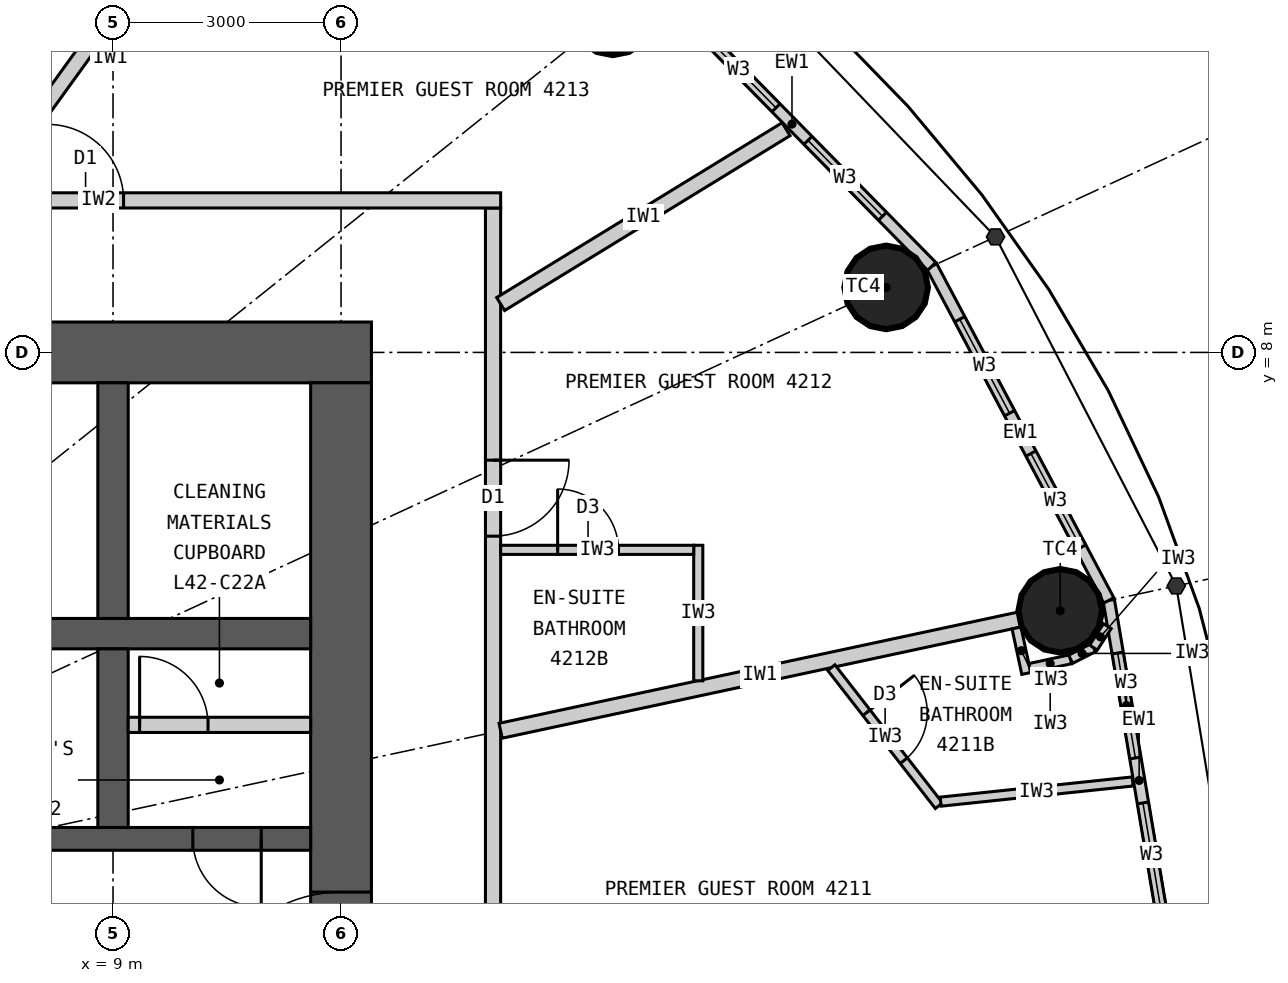
"""IFC4 building model, lengths in metres.
Left out: names, types, materials, properties, quantities, classifications, styles, units other than length and angle.
Written with IfcOpenShell. Run it as: python <this file> out.ifc"""

import sys

from ifc_helpers import new_model, si_unit, direction, frame, frame_2d, origin, origin_2d, place, context, subcontext, project, spatial, rectangle, circle, extrude, element, fill, save


model = new_model("IFC4")
c1 = context("Model", 3, precision=1e-05, world=origin(), true_north=direction((0.0, 1.0)))
c2 = subcontext(c1, "Body", "Model", "MODEL_VIEW")
j1 = project(units=[si_unit("LENGTHUNIT", "METRE"), si_unit("PLANEANGLEUNIT", "RADIAN")], contexts=[c1])
p1 = place(None, origin())
s1 = spatial("IfcSite", under=j1, at=p1, CompositionType="ELEMENT")
p2 = place(p1, origin())
s2 = spatial("IfcBuilding", under=s1, at=p2, CompositionType="ELEMENT")
p3 = place(p2, frame((0.0, 0.0, 159.9)))
s3 = spatial("IfcBuildingStorey", under=s2, at=p3, CompositionType="ELEMENT", Elevation=159.9)
for number, where, z_axis, x_axis in (
    (1, (21.463, 4.601, 0.0), (0.0, 0.0, 1.0), (1.0, 0.0, 0.0)),
    (2, (19.172, 8.855, 0.0), (0.0, 0.0, 1.0), (1.0, 0.0, 0.0)),
    (3, (15.576, 12.461, 0.0), (0.0, 0.0, 1.0), (1.0, 0.0, 0.0)),
):
    element("IfcColumn", number, at=place(p3, frame(where, z_axis=z_axis, x_axis=x_axis)), inside=s3, PredefinedType="COLUMN", context=c2, shape_type="SweptSolid", body=[
        extrude(circle(Radius=0.55, at=origin_2d()), origin(), (0.0, 0.0, 1.0), 3.3),
    ])
p4 = place(p3, frame((-12.4, 8.0, 0.0), z_axis=(0.0, 0.0, 1.0), x_axis=(1.0, 0.0, 0.0)))
e4 = element("IfcWall", 4, at=p4, inside=s3, PredefinedType="SHEAR", context=c2, shape_type="SweptSolid", body=[
    extrude(rectangle(XDim=24.8, YDim=0.8, at=frame_2d((12.4, 0.0))), origin(), (0.0, 0.0, 1.0), 3.3),
])
p5 = place(p4, frame((11.1, 0.0, 0.0)))
e5 = element("IfcOpeningElement", 5, at=p5, cuts=e4, PredefinedType="OPENING", context=c2, shape_type="SweptSolid", body=[
    extrude(rectangle(XDim=1.2, YDim=2.2, at=frame_2d((0.6, 1.1))), frame((0.0, 0.41, 0.0), z_axis=(0.0, -1.0, 0.0), x_axis=(1.0, 0.0, 0.0)), (0.0, 0.0, 1.0), 0.82),
])
p6 = place(p4, frame((18.7, 0.0, 0.0)))
e6 = element("IfcOpeningElement", 6, at=p6, cuts=e4, PredefinedType="OPENING", context=c2, shape_type="SweptSolid", body=[
    extrude(rectangle(XDim=0.9, YDim=2.2, at=frame_2d((0.45, 1.1))), frame((0.0, 0.41, 0.0), z_axis=(0.0, -1.0, 0.0), x_axis=(1.0, 0.0, 0.0)), (0.0, 0.0, 1.0), 0.82),
])
p7 = place(p3, frame((12.0, -7.6, 0.0), z_axis=(0.0, 0.0, 1.0), x_axis=(0.0, 1.0, 0.0)))
e7 = element("IfcWall", 7, at=p7, inside=s3, PredefinedType="SHEAR", context=c2, shape_type="SweptSolid", body=[
    extrude(rectangle(XDim=15.2, YDim=0.8, at=frame_2d((7.6, 0.0))), origin(), (0.0, 0.0, 1.0), 3.3),
])
p8 = place(p7, frame((6.7, 0.0, 0.0)))
e8 = element("IfcOpeningElement", 8, at=p8, cuts=e7, PredefinedType="OPENING", context=c2, shape_type="SweptSolid", body=[
    extrude(rectangle(XDim=1.8, YDim=2.2, at=frame_2d((0.9, 1.1))), frame((0.0, 0.41, 0.0), z_axis=(0.0, -1.0, 0.0), x_axis=(1.0, 0.0, 0.0)), (0.0, 0.0, 1.0), 0.82),
])
p9 = place(p3, frame((-11.6, 4.3, 0.0), z_axis=(0.0, 0.0, 1.0), x_axis=(1.0, 0.0, 0.0)))
e9 = element("IfcWall", 9, at=p9, inside=s3, PredefinedType="SHEAR", context=c2, shape_type="SweptSolid", body=[
    extrude(rectangle(XDim=23.2, YDim=0.4, at=frame_2d((11.6, 0.0))), origin(), (0.0, 0.0, 1.0), 3.3),
])
p10 = place(p3, frame((-11.6, 1.6, 0.0), z_axis=(0.0, 0.0, 1.0), x_axis=(1.0, 0.0, 0.0)))
e10 = element("IfcWall", 10, at=p10, inside=s3, PredefinedType="SHEAR", context=c2, shape_type="SweptSolid", body=[
    extrude(rectangle(XDim=23.2, YDim=0.3, at=frame_2d((11.6, 0.0))), origin(), (0.0, 0.0, 1.0), 3.3),
])
p11 = place(p10, frame((9.55, 0.0, 0.0)))
e11 = element("IfcOpeningElement", 11, at=p11, cuts=e10, PredefinedType="OPENING", context=c2, shape_type="SweptSolid", body=[
    extrude(rectangle(XDim=1.1, YDim=2.2, at=frame_2d((0.55, 1.1))), frame((0.0, 0.16, 0.0), z_axis=(0.0, -1.0, 0.0), x_axis=(1.0, 0.0, 0.0)), (0.0, 0.0, 1.0), 0.32),
])
p12 = place(p10, frame((12.55, 0.0, 0.0)))
e12 = element("IfcOpeningElement", 12, at=p12, cuts=e10, PredefinedType="OPENING", context=c2, shape_type="SweptSolid", body=[
    extrude(rectangle(XDim=1.1, YDim=2.2, at=frame_2d((0.55, 1.1))), frame((0.0, 0.16, 0.0), z_axis=(0.0, -1.0, 0.0), x_axis=(1.0, 0.0, 0.0)), (0.0, 0.0, 1.0), 0.32),
])
p13 = place(p10, frame((0.65, 0.0, 0.0)))
e13 = element("IfcOpeningElement", 13, at=p13, cuts=e10, PredefinedType="OPENING", context=c2, shape_type="SweptSolid", body=[
    extrude(rectangle(XDim=0.9, YDim=2.2, at=frame_2d((0.45, 1.1))), frame((0.0, 0.16, 0.0), z_axis=(0.0, -1.0, 0.0), x_axis=(1.0, 0.0, 0.0)), (0.0, 0.0, 1.0), 0.32),
])
p14 = place(p10, frame((21.65, 0.0, 0.0)))
e14 = element("IfcOpeningElement", 14, at=p14, cuts=e10, PredefinedType="OPENING", context=c2, shape_type="SweptSolid", body=[
    extrude(rectangle(XDim=0.9, YDim=2.2, at=frame_2d((0.45, 1.1))), frame((0.0, 0.16, 0.0), z_axis=(0.0, -1.0, 0.0), x_axis=(1.0, 0.0, 0.0)), (0.0, 0.0, 1.0), 0.32),
])
p15 = place(p10, frame((3.65, 0.0, 0.0)))
e15 = element("IfcOpeningElement", 15, at=p15, cuts=e10, PredefinedType="OPENING", context=c2, shape_type="SweptSolid", body=[
    extrude(rectangle(XDim=0.9, YDim=2.2, at=frame_2d((0.45, 1.1))), frame((0.0, 0.16, 0.0), z_axis=(0.0, -1.0, 0.0), x_axis=(1.0, 0.0, 0.0)), (0.0, 0.0, 1.0), 0.32),
])
p16 = place(p10, frame((6.65, 0.0, 0.0)))
e16 = element("IfcOpeningElement", 16, at=p16, cuts=e10, PredefinedType="OPENING", context=c2, shape_type="SweptSolid", body=[
    extrude(rectangle(XDim=0.9, YDim=2.2, at=frame_2d((0.45, 1.1))), frame((0.0, 0.16, 0.0), z_axis=(0.0, -1.0, 0.0), x_axis=(1.0, 0.0, 0.0)), (0.0, 0.0, 1.0), 0.32),
])
p17 = place(p3, frame((9.0, 4.5, 0.0), z_axis=(0.0, 0.0, 1.0), x_axis=(0.0, 1.0, 0.0)))
e17 = element("IfcWall", 17, at=p17, inside=s3, PredefinedType="SHEAR", context=c2, shape_type="SweptSolid", body=[
    extrude(rectangle(XDim=3.1, YDim=0.4, at=frame_2d((1.55, 0.0))), origin(), (0.0, 0.0, 1.0), 3.3),
])
p18 = place(p3, frame((9.0, 1.75, 0.0), z_axis=(0.0, 0.0, 1.0), x_axis=(0.0, 1.0, 0.0)))
e18 = element("IfcWall", 18, at=p18, inside=s3, PredefinedType="SHEAR", context=c2, shape_type="SweptSolid", body=[
    extrude(rectangle(XDim=2.35, YDim=0.4, at=frame_2d((1.175, 0.0))), origin(), (0.0, 0.0, 1.0), 3.3),
])
p19 = place(p3, frame((22.9, 0.0, 0.0), z_axis=(0.0, 0.0, 1.0), x_axis=(-0.166162111254, 0.986098449843, 0.0)))
e19 = element("IfcWall", 19, at=p19, inside=s3, PredefinedType="ELEMENTEDWALL", context=c2, shape_type="SweptSolid", body=[
    extrude(rectangle(XDim=4.805, YDim=0.15, at=frame_2d((2.402, 0.0))), origin(), (0.0, 0.0, 1.0), 3.12),
])
p20 = place(p19, frame((0.702, 0.0, 0.9)))
e20 = element("IfcOpeningElement", 20, at=p20, cuts=e19, PredefinedType="OPENING", context=c2, shape_type="SweptSolid", body=[
    extrude(rectangle(XDim=1.4, YDim=1.9, at=frame_2d((0.7, 0.95))), frame((0.0, 0.085, 0.0), z_axis=(0.0, -1.0, 0.0), x_axis=(1.0, 0.0, 0.0)), (0.0, 0.0, 1.0), 0.17),
])
p21 = place(p19, frame((2.702, 0.0, 0.9)))
e21 = element("IfcOpeningElement", 21, at=p21, cuts=e19, PredefinedType="OPENING", context=c2, shape_type="SweptSolid", body=[
    extrude(rectangle(XDim=1.4, YDim=1.9, at=frame_2d((0.7, 0.95))), frame((0.0, 0.085, 0.0), z_axis=(0.0, -1.0, 0.0), x_axis=(1.0, 0.0, 0.0)), (0.0, 0.0, 1.0), 0.17),
])
p22 = place(p3, frame((22.102, 4.738, 0.0), z_axis=(0.0, 0.0, 1.0), x_axis=(-0.468428906714, 0.883501193748, 0.0)))
e22 = element("IfcWall", 22, at=p22, inside=s3, PredefinedType="ELEMENTEDWALL", context=c2, shape_type="SweptSolid", body=[
    extrude(rectangle(XDim=4.974, YDim=0.15, at=frame_2d((2.487, 0.0))), origin(), (0.0, 0.0, 1.0), 3.12),
])
p23 = place(p22, frame((0.787, 0.0, 0.9)))
e23 = element("IfcOpeningElement", 23, at=p23, cuts=e22, PredefinedType="OPENING", context=c2, shape_type="SweptSolid", body=[
    extrude(rectangle(XDim=1.4, YDim=1.9, at=frame_2d((0.7, 0.95))), frame((0.0, 0.085, 0.0), z_axis=(0.0, -1.0, 0.0), x_axis=(1.0, 0.0, 0.0)), (0.0, 0.0, 1.0), 0.17),
])
p24 = place(p22, frame((2.787, 0.0, 0.9)))
e24 = element("IfcOpeningElement", 24, at=p24, cuts=e22, PredefinedType="OPENING", context=c2, shape_type="SweptSolid", body=[
    extrude(rectangle(XDim=1.4, YDim=1.9, at=frame_2d((0.7, 0.95))), frame((0.0, 0.085, 0.0), z_axis=(0.0, -1.0, 0.0), x_axis=(1.0, 0.0, 0.0)), (0.0, 0.0, 1.0), 0.17),
])
p25 = place(p3, frame((19.772, 9.132, 0.0), z_axis=(0.0, 0.0, 1.0), x_axis=(-0.700727467776, 0.71342905457, 0.0)))
e25 = element("IfcWall", 25, at=p25, inside=s3, PredefinedType="ELEMENTEDWALL", context=c2, shape_type="SweptSolid", body=[
    extrude(rectangle(XDim=5.247, YDim=0.15, at=frame_2d((2.624, 0.0))), origin(), (0.0, 0.0, 1.0), 3.12),
])
p26 = place(p25, frame((0.924, 0.0, 0.9)))
e26 = element("IfcOpeningElement", 26, at=p26, cuts=e25, PredefinedType="OPENING", context=c2, shape_type="SweptSolid", body=[
    extrude(rectangle(XDim=1.4, YDim=1.9, at=frame_2d((0.7, 0.95))), frame((0.0, 0.085, 0.0), z_axis=(0.0, -1.0, 0.0), x_axis=(1.0, 0.0, 0.0)), (0.0, 0.0, 1.0), 0.17),
])
p27 = place(p25, frame((2.924, 0.0, 0.9)))
e27 = element("IfcOpeningElement", 27, at=p27, cuts=e25, PredefinedType="OPENING", context=c2, shape_type="SweptSolid", body=[
    extrude(rectangle(XDim=1.4, YDim=1.9, at=frame_2d((0.7, 0.95))), frame((0.0, 0.085, 0.0), z_axis=(0.0, -1.0, 0.0), x_axis=(1.0, 0.0, 0.0)), (0.0, 0.0, 1.0), 0.17),
])
p28 = place(p3, frame((14.0, -9.9, 0.0), z_axis=(0.0, 0.0, 1.0), x_axis=(0.0, 1.0, 0.0)))
e28 = element("IfcWall", 28, at=p28, inside=s3, PredefinedType="PARTITIONING", context=c2, shape_type="SweptSolid", body=[
    extrude(rectangle(XDim=19.8, YDim=0.2, at=frame_2d((9.9, 0.0))), origin(), (0.0, 0.0, 1.0), 3.12),
])
p29 = place(p28, frame((3.824, 0.0, 0.0)))
e29 = element("IfcOpeningElement", 29, at=p29, cuts=e28, PredefinedType="OPENING", context=c2, shape_type="SweptSolid", body=[
    extrude(rectangle(XDim=1.0, YDim=2.2, at=frame_2d((0.5, 1.1))), frame((0.0, 0.11, 0.0), z_axis=(0.0, -1.0, 0.0), x_axis=(1.0, 0.0, 0.0)), (0.0, 0.0, 1.0), 0.22),
])
p30 = place(p28, frame((8.719, 0.0, 0.0)))
e30 = element("IfcOpeningElement", 30, at=p30, cuts=e28, PredefinedType="OPENING", context=c2, shape_type="SweptSolid", body=[
    extrude(rectangle(XDim=1.0, YDim=2.2, at=frame_2d((0.5, 1.1))), frame((0.0, 0.11, 0.0), z_axis=(0.0, -1.0, 0.0), x_axis=(1.0, 0.0, 0.0)), (0.0, 0.0, 1.0), 0.22),
])
p31 = place(p28, frame((15.482, 0.0, 0.0)))
e31 = element("IfcOpeningElement", 31, at=p31, cuts=e28, PredefinedType="OPENING", context=c2, shape_type="SweptSolid", body=[
    extrude(rectangle(XDim=1.0, YDim=2.2, at=frame_2d((0.5, 1.1))), frame((0.0, 0.11, 0.0), z_axis=(0.0, -1.0, 0.0), x_axis=(1.0, 0.0, 0.0)), (0.0, 0.0, 1.0), 0.22),
])
p32 = place(p3, frame((14.1, 3.022, 0.0), z_axis=(0.0, 0.0, 1.0), x_axis=(0.977790639684, 0.209584028367, 0.0)))
e32 = element("IfcWall", 32, at=p32, inside=s3, PredefinedType="PARTITIONING", context=c2, shape_type="SweptSolid", body=[
    extrude(rectangle(XDim=6.98, YDim=0.2, at=frame_2d((3.49, 0.0))), origin(), (0.0, 0.0, 1.0), 2.42),
])
p33 = place(p3, frame((14.1, 8.636, 0.0), z_axis=(0.0, 0.0, 1.0), x_axis=(0.852731884196, 0.522348862041, 0.0)))
e33 = element("IfcWall", 33, at=p33, inside=s3, PredefinedType="PARTITIONING", context=c2, shape_type="SweptSolid", body=[
    extrude(rectangle(XDim=4.404, YDim=0.2, at=frame_2d((2.202, 0.0))), origin(), (0.0, 0.0, 1.0), 3.12),
])
p34 = place(p3, frame((7.289, 10.1, 0.0), z_axis=(0.0, 0.0, 1.0), x_axis=(0.585222595178, 0.810872686735, 0.0)))
e34 = element("IfcWall", 34, at=p34, inside=s3, PredefinedType="PARTITIONING", context=c2, shape_type="SweptSolid", body=[
    extrude(rectangle(XDim=5.722, YDim=0.2, at=frame_2d((2.861, 0.0))), origin(), (0.0, 0.0, 1.0), 2.42),
])
p35 = place(p3, frame((18.451, 3.853, 0.0), z_axis=(0.0, 0.0, 1.0), x_axis=(0.614703538382, -0.788758239197, 0.0)))
e35 = element("IfcWall", 35, at=p35, inside=s3, PredefinedType="PARTITIONING", context=c2, shape_type="SweptSolid", body=[
    extrude(rectangle(XDim=2.303, YDim=0.12, at=frame_2d((1.152, 0.0))), origin(), (0.0, 0.0, 1.0), 3.12),
])
p36 = place(p35, frame((0.752, 0.0, 0.0)))
e36 = element("IfcOpeningElement", 36, at=p36, cuts=e35, PredefinedType="OPENING", context=c2, shape_type="SweptSolid", body=[
    extrude(rectangle(XDim=0.8, YDim=2.1, at=frame_2d((0.4, 1.05))), frame((0.0, 0.07, 0.0), z_axis=(0.0, -1.0, 0.0), x_axis=(1.0, 0.0, 0.0)), (0.0, 0.0, 1.0), 0.14),
])
p37 = place(p3, frame((19.89, 2.09, 0.0), z_axis=(0.0, 0.0, 1.0), x_axis=(0.994527025269, 0.104479644, 0.0)))
e37 = element("IfcWall", 37, at=p37, inside=s3, PredefinedType="PARTITIONING", context=c2, shape_type="SweptSolid", body=[
    extrude(rectangle(XDim=2.54, YDim=0.12, at=frame_2d((1.27, 0.0))), origin(), (0.0, 0.0, 1.0), 3.12),
])
p38 = place(p3, frame((20.887, 4.375, 0.0), z_axis=(0.0, 0.0, 1.0), x_axis=(0.209746941802, -0.977755705892, 0.0)))
e38 = element("IfcWall", 38, at=p38, inside=s3, PredefinedType="PARTITIONING", context=c2, shape_type="SweptSolid", body=[
    extrude(rectangle(XDim=0.612, YDim=0.12, at=frame_2d((0.306, 0.0))), origin(), (0.0, 0.0, 1.0), 3.12),
])
p39 = place(p3, frame((21.062, 3.848, 0.0), z_axis=(0.0, 0.0, 1.0), x_axis=(0.977789415726, 0.209589738521, 0.0)))
e39 = element("IfcWall", 39, at=p39, inside=s3, PredefinedType="PARTITIONING", context=c2, shape_type="SweptSolid", body=[
    extrude(rectangle(XDim=0.55, YDim=0.12, at=frame_2d((0.275, 0.0))), origin(), (0.0, 0.0, 1.0), 3.12),
])
p40 = place(p3, frame((21.599, 3.963, 0.0), z_axis=(0.0, 0.0, 1.0), x_axis=(0.890193602875, 0.455582428766, 0.0)))
e40 = element("IfcWall", 40, at=p40, inside=s3, PredefinedType="PARTITIONING", context=c2, shape_type="SweptSolid", body=[
    extrude(rectangle(XDim=0.338, YDim=0.12, at=frame_2d((0.169, 0.0))), origin(), (0.0, 0.0, 1.0), 3.12),
])
p41 = place(p3, frame((21.9, 4.117, 0.0), z_axis=(0.0, 0.0, 1.0), x_axis=(0.543582688681, 0.839355622228, 0.0)))
e41 = element("IfcWall", 41, at=p41, inside=s3, PredefinedType="PARTITIONING", context=c2, shape_type="SweptSolid", body=[
    extrude(rectangle(XDim=0.336, YDim=0.12, at=frame_2d((0.168, 0.0))), origin(), (0.0, 0.0, 1.0), 3.12),
])
p42 = place(p3, frame((16.7, 3.68, 0.0), z_axis=(0.0, 0.0, 1.0), x_axis=(0.0, 1.0, 0.0)))
e42 = element("IfcWall", 42, at=p42, inside=s3, PredefinedType="PARTITIONING", context=c2, shape_type="SweptSolid", body=[
    extrude(rectangle(XDim=1.783, YDim=0.12, at=frame_2d((0.891, 0.0))), origin(), (0.0, 0.0, 1.0), 3.12),
])
p43 = place(p3, frame((14.1, 5.403, 0.0), z_axis=(0.0, 0.0, 1.0), x_axis=(1.0, 0.0, 0.0)))
e43 = element("IfcWall", 43, at=p43, inside=s3, PredefinedType="PARTITIONING", context=c2, shape_type="SweptSolid", body=[
    extrude(rectangle(XDim=2.54, YDim=0.12, at=frame_2d((1.27, 0.0))), origin(), (0.0, 0.0, 1.0), 3.12),
])
p44 = place(p43, frame((0.75, 0.0, 0.0)))
e44 = element("IfcOpeningElement", 44, at=p44, cuts=e43, PredefinedType="OPENING", context=c2, shape_type="SweptSolid", body=[
    extrude(rectangle(XDim=0.8, YDim=2.1, at=frame_2d((0.4, 1.05))), frame((0.0, 0.07, 0.0), z_axis=(0.0, -1.0, 0.0), x_axis=(1.0, 0.0, 0.0)), (0.0, 0.0, 1.0), 0.14),
])
p45 = place(p3, frame((3.518, 10.0, 0.0), z_axis=(0.0, 0.0, 1.0), x_axis=(1.0, 0.0, 0.0)))
e45 = element("IfcWall", 45, at=p45, inside=s3, PredefinedType="PARTITIONING", context=c2, shape_type="SweptSolid", body=[
    extrude(rectangle(XDim=10.582, YDim=0.2, at=frame_2d((5.291, 0.0))), origin(), (0.0, 0.0, 1.0), 3.12),
])
p46 = place(p45, frame((4.621, 0.0, 0.0)))
e46 = element("IfcOpeningElement", 46, at=p46, cuts=e45, PredefinedType="OPENING", context=c2, shape_type="SweptSolid", body=[
    extrude(rectangle(XDim=1.0, YDim=2.2, at=frame_2d((0.5, 1.1))), frame((0.0, 0.11, 0.0), z_axis=(0.0, -1.0, 0.0), x_axis=(1.0, 0.0, 0.0)), (0.0, 0.0, 1.0), 0.22),
])
p47 = place(p3, frame((9.2, 3.1, 0.0), z_axis=(0.0, 0.0, 1.0), x_axis=(1.0, 0.0, 0.0)))
e47 = element("IfcWall", 47, at=p47, inside=s3, PredefinedType="PARTITIONING", context=c2, shape_type="SweptSolid", body=[
    extrude(rectangle(XDim=2.4, YDim=0.2, at=frame_2d((1.2, 0.0))), origin(), (0.0, 0.0, 1.0), 3.12),
])
p48 = place(p47, frame((0.15, 0.0, 0.0)))
e48 = element("IfcOpeningElement", 48, at=p48, cuts=e47, PredefinedType="OPENING", context=c2, shape_type="SweptSolid", body=[
    extrude(rectangle(XDim=0.9, YDim=2.2, at=frame_2d((0.45, 1.1))), frame((0.0, 0.11, 0.0), z_axis=(0.0, -1.0, 0.0), x_axis=(1.0, 0.0, 0.0)), (0.0, 0.0, 1.0), 0.22),
])
p49 = place(p20, origin())
e49 = element("IfcWindow", 49, at=p49, inside=s3, PartitioningType="SINGLE_PANEL", PredefinedType="WINDOW", context=c2, shape_type="SweptSolid", body=[
    extrude(rectangle(XDim=1.4, YDim=1.9, at=frame_2d((0.7, 0.95))), frame((0.0, 0.03, 0.0), z_axis=(0.0, -1.0, 0.0), x_axis=(1.0, 0.0, 0.0)), (0.0, 0.0, 1.0), 0.06),
])
fill(e20, e49)
p50 = place(p21, origin())
e50 = element("IfcWindow", 50, at=p50, inside=s3, PartitioningType="SINGLE_PANEL", PredefinedType="WINDOW", context=c2, shape_type="SweptSolid", body=[
    extrude(rectangle(XDim=1.4, YDim=1.9, at=frame_2d((0.7, 0.95))), frame((0.0, 0.03, 0.0), z_axis=(0.0, -1.0, 0.0), x_axis=(1.0, 0.0, 0.0)), (0.0, 0.0, 1.0), 0.06),
])
fill(e21, e50)
p51 = place(p23, origin())
e51 = element("IfcWindow", 51, at=p51, inside=s3, PartitioningType="SINGLE_PANEL", PredefinedType="WINDOW", context=c2, shape_type="SweptSolid", body=[
    extrude(rectangle(XDim=1.4, YDim=1.9, at=frame_2d((0.7, 0.95))), frame((0.0, 0.03, 0.0), z_axis=(0.0, -1.0, 0.0), x_axis=(1.0, 0.0, 0.0)), (0.0, 0.0, 1.0), 0.06),
])
fill(e23, e51)
p52 = place(p24, origin())
e52 = element("IfcWindow", 52, at=p52, inside=s3, PartitioningType="SINGLE_PANEL", PredefinedType="WINDOW", context=c2, shape_type="SweptSolid", body=[
    extrude(rectangle(XDim=1.4, YDim=1.9, at=frame_2d((0.7, 0.95))), frame((0.0, 0.03, 0.0), z_axis=(0.0, -1.0, 0.0), x_axis=(1.0, 0.0, 0.0)), (0.0, 0.0, 1.0), 0.06),
])
fill(e24, e52)
p53 = place(p26, origin())
e53 = element("IfcWindow", 53, at=p53, inside=s3, PartitioningType="SINGLE_PANEL", PredefinedType="WINDOW", context=c2, shape_type="SweptSolid", body=[
    extrude(rectangle(XDim=1.4, YDim=1.9, at=frame_2d((0.7, 0.95))), frame((0.0, 0.03, 0.0), z_axis=(0.0, -1.0, 0.0), x_axis=(1.0, 0.0, 0.0)), (0.0, 0.0, 1.0), 0.06),
])
fill(e26, e53)
p54 = place(p27, origin())
e54 = element("IfcWindow", 54, at=p54, inside=s3, PartitioningType="SINGLE_PANEL", PredefinedType="WINDOW", context=c2, shape_type="SweptSolid", body=[
    extrude(rectangle(XDim=1.4, YDim=1.9, at=frame_2d((0.7, 0.95))), frame((0.0, 0.03, 0.0), z_axis=(0.0, -1.0, 0.0), x_axis=(1.0, 0.0, 0.0)), (0.0, 0.0, 1.0), 0.06),
])
fill(e27, e54)
p55 = place(p36, origin())
e55 = element("IfcDoor", 55, at=p55, inside=s3, OperationType="SINGLE_SWING_LEFT", PredefinedType="DOOR", context=c2, shape_type="SweptSolid", body=[
    extrude(rectangle(XDim=0.8, YDim=2.1, at=frame_2d((0.4, 1.05))), frame((0.0, 0.025, 0.0), z_axis=(0.0, -1.0, 0.0), x_axis=(1.0, 0.0, 0.0)), (0.0, 0.0, 1.0), 0.05),
])
fill(e36, e55)
p56 = place(p44, origin())
e56 = element("IfcDoor", 56, at=p56, inside=s3, OperationType="SINGLE_SWING_LEFT", PredefinedType="DOOR", context=c2, shape_type="SweptSolid", body=[
    extrude(rectangle(XDim=0.8, YDim=2.1, at=frame_2d((0.4, 1.05))), frame((0.0, 0.025, 0.0), z_axis=(0.0, -1.0, 0.0), x_axis=(1.0, 0.0, 0.0)), (0.0, 0.0, 1.0), 0.05),
])
fill(e44, e56)
p57 = place(p31, origin())
e57 = element("IfcDoor", 57, at=p57, inside=s3, OperationType="SINGLE_SWING_RIGHT", PredefinedType="DOOR", context=c2, shape_type="SweptSolid", body=[
    extrude(rectangle(XDim=1.0, YDim=2.2, at=frame_2d((0.5, 1.1))), frame((0.0, 0.025, 0.0), z_axis=(0.0, -1.0, 0.0), x_axis=(1.0, 0.0, 0.0)), (0.0, 0.0, 1.0), 0.05),
])
fill(e31, e57)
p58 = place(p46, origin())
e58 = element("IfcDoor", 58, at=p58, inside=s3, OperationType="SINGLE_SWING_LEFT", PredefinedType="DOOR", context=c2, shape_type="SweptSolid", body=[
    extrude(rectangle(XDim=1.0, YDim=2.2, at=frame_2d((0.5, 1.1))), frame((0.0, 0.025, 0.0), z_axis=(0.0, -1.0, 0.0), x_axis=(1.0, 0.0, 0.0)), (0.0, 0.0, 1.0), 0.05),
])
fill(e46, e58)
p59 = place(p48, origin())
e59 = element("IfcDoor", 59, at=p59, inside=s3, OperationType="SINGLE_SWING_LEFT", PredefinedType="DOOR", context=c2, shape_type="SweptSolid", body=[
    extrude(rectangle(XDim=0.9, YDim=2.2, at=frame_2d((0.45, 1.1))), frame((0.0, 0.025, 0.0), z_axis=(0.0, -1.0, 0.0), x_axis=(1.0, 0.0, 0.0)), (0.0, 0.0, 1.0), 0.05),
])
fill(e48, e59)
p60 = place(p14, origin())
e60 = element("IfcDoor", 60, at=p60, inside=s3, OperationType="SINGLE_SWING_RIGHT", PredefinedType="DOOR", context=c2, shape_type="SweptSolid", body=[
    extrude(rectangle(XDim=0.9, YDim=2.2, at=frame_2d((0.45, 1.1))), frame((0.0, 0.025, 0.0), z_axis=(0.0, -1.0, 0.0), x_axis=(1.0, 0.0, 0.0)), (0.0, 0.0, 1.0), 0.05),
])
fill(e14, e60)
p61 = place(p8, origin())
e61 = element("IfcDoor", 61, at=p61, inside=s3, OperationType="DOUBLE_DOOR_DOUBLE_SWING", PredefinedType="DOOR", context=c2, shape_type="SweptSolid", body=[
    extrude(rectangle(XDim=1.8, YDim=2.2, at=frame_2d((0.9, 1.1))), frame((0.0, 0.025, 0.0), z_axis=(0.0, -1.0, 0.0), x_axis=(1.0, 0.0, 0.0)), (0.0, 0.0, 1.0), 0.05),
])
fill(e8, e61)
save(model, sys.argv[1])
